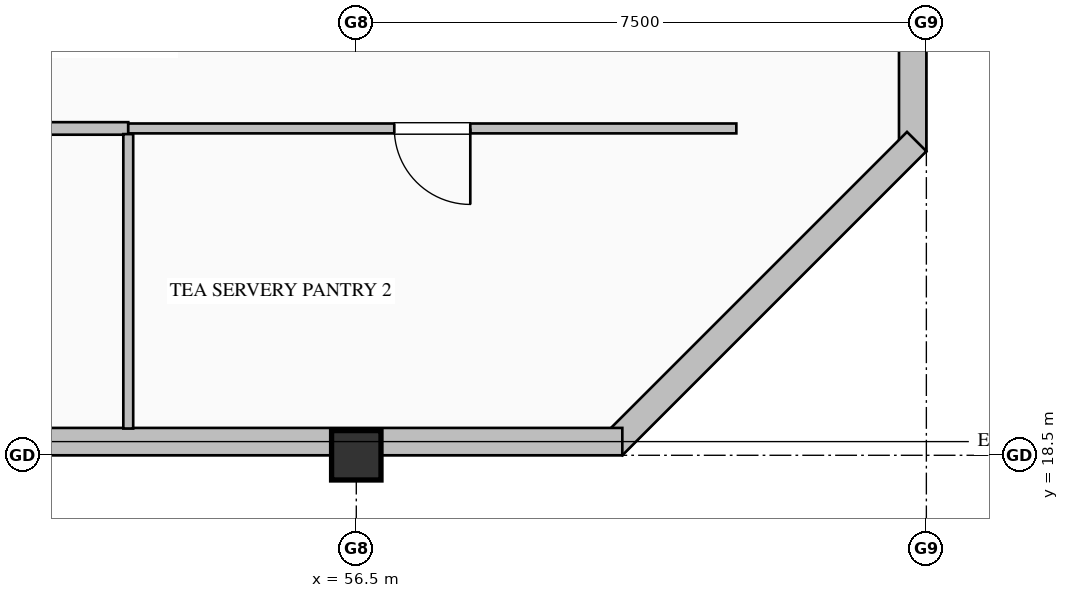
"""IFC4 building model, lengths in metres.
Left out: names, types, materials, properties, quantities, classifications, styles, units other than length and angle.
Written with IfcOpenShell. Run it as: python <this file> out.ifc"""

import sys

from ifc_helpers import new_model, si_unit, direction, frame, frame_2d, origin, origin_2d, place, context, subcontext, project, spatial, rectangle, hollow_rectangle, extrude, element, fill, save


model = new_model("IFC4")
c1 = context("Model", 3, precision=1e-05, world=origin(), true_north=direction((0.0, 1.0)))
c2 = subcontext(c1, "Body", "Model", "MODEL_VIEW")
j1 = project(units=[si_unit("LENGTHUNIT", "METRE"), si_unit("PLANEANGLEUNIT", "RADIAN")], contexts=[c1])
p1 = place(None, origin())
s1 = spatial("IfcSite", under=j1, at=p1, CompositionType="ELEMENT")
p2 = place(p1, origin())
s2 = spatial("IfcBuilding", under=s1, at=p2, CompositionType="ELEMENT")
p3 = place(p2, frame((0.0, 0.0, 327.2)))
s3 = spatial("IfcBuildingStorey", under=s2, at=p3, CompositionType="ELEMENT", Elevation=327.2)
p4 = place(p3, frame((56.5, 18.5, 0.0), z_axis=(0.0, 0.0, 1.0), x_axis=(1.0, 0.0, 0.0)))
e1 = element("IfcColumn", 1, at=p4, inside=s3, PredefinedType="COLUMN", context=c2, shape_type="SweptSolid", body=[
    extrude(hollow_rectangle(XDim=0.65, YDim=0.65, WallThickness=0.028, at=origin_2d()), origin(), (0.0, 0.0, 1.0), 4.0),
])
p5 = place(p3, frame((63.82, 36.05, 0.0), z_axis=(0.0, 0.0, 1.0), x_axis=(0.0, -1.0, 0.0)))
e2 = element("IfcWall", 2, at=p5, inside=s3, PredefinedType="SOLIDWALL", context=c2, shape_type="SweptSolid", body=[
    extrude(rectangle(XDim=13.55, YDim=0.36, at=frame_2d((6.775, 0.0))), origin(), (0.0, 0.0, 1.0), 3.335),
])
p6 = place(p5, frame((3.075, 0.0, 0.8)))
e3 = element("IfcOpeningElement", 3, at=p6, cuts=e2, PredefinedType="OPENING", context=c2, shape_type="SweptSolid", body=[
    extrude(rectangle(XDim=1.05, YDim=2.15, at=frame_2d((0.525, 1.075))), frame((0.0, 0.19, 0.0), z_axis=(0.0, -1.0, 0.0), x_axis=(1.0, 0.0, 0.0)), (0.0, 0.0, 1.0), 0.38),
])
p7 = place(p3, frame((63.873, 22.627, 0.0), z_axis=(0.0, 0.0, 1.0), x_axis=(-0.707106781187, -0.707106781187, 0.0)))
e4 = element("IfcWall", 4, at=p7, inside=s3, PredefinedType="SOLIDWALL", context=c2, shape_type="SweptSolid", body=[
    extrude(rectangle(XDim=5.657, YDim=0.36, at=frame_2d((2.828, 0.0))), origin(), (0.0, 0.0, 1.0), 3.785),
])
p8 = place(p3, frame((60.0, 18.68, 0.0), z_axis=(0.0, 0.0, 1.0), x_axis=(-1.0, 0.0, 0.0)))
e5 = element("IfcWall", 5, at=p8, inside=s3, PredefinedType="SOLIDWALL", context=c2, shape_type="SweptSolid", body=[
    extrude(rectangle(XDim=15.5, YDim=0.36, at=frame_2d((7.75, 0.0))), origin(), (0.0, 0.0, 1.0), 3.335),
])
p9 = place(p3, frame((53.5, 22.8, 0.0), z_axis=(0.0, 0.0, 1.0), x_axis=(-1.0, 0.0, 0.0)))
e6 = element("IfcWall", 6, at=p9, inside=s3, PredefinedType="PARTITIONING", context=c2, shape_type="SweptSolid", body=[
    extrude(rectangle(XDim=8.3, YDim=0.165, at=frame_2d((4.15, 0.0))), origin(), (0.0, 0.0, 1.0), 3.785),
])
p10 = place(p9, frame((3.65, 0.0, 0.0)))
e7 = element("IfcOpeningElement", 7, at=p10, cuts=e6, PredefinedType="OPENING", context=c2, shape_type="SweptSolid", body=[
    extrude(rectangle(XDim=1.0, YDim=2.15, at=frame_2d((0.5, 1.075))), frame((0.0, 0.093, 0.0), z_axis=(0.0, -1.0, 0.0), x_axis=(1.0, 0.0, 0.0)), (0.0, 0.0, 1.0), 0.185),
])
p11 = place(p3, frame((61.5, 22.8, 0.0), z_axis=(0.0, 0.0, 1.0), x_axis=(-1.0, 0.0, 0.0)))
e8 = element("IfcWall", 8, at=p11, inside=s3, PredefinedType="PARTITIONING", context=c2, shape_type="SweptSolid", body=[
    extrude(rectangle(XDim=8.0, YDim=0.13, at=frame_2d((4.0, 0.0))), origin(), (0.0, 0.0, 1.0), 3.785),
])
p12 = place(p11, frame((3.5, 0.0, 0.0)))
e9 = element("IfcOpeningElement", 9, at=p12, cuts=e8, PredefinedType="OPENING", context=c2, shape_type="SweptSolid", body=[
    extrude(rectangle(XDim=1.0, YDim=2.15, at=frame_2d((0.5, 1.075))), frame((0.0, 0.075, 0.0), z_axis=(0.0, -1.0, 0.0), x_axis=(1.0, 0.0, 0.0)), (0.0, 0.0, 1.0), 0.15),
])
p13 = place(p3, frame((53.5, 22.726, 0.0), z_axis=(0.0, 0.0, 1.0), x_axis=(0.0, -1.0, 0.0)))
e10 = element("IfcWall", 10, at=p13, inside=s3, PredefinedType="PARTITIONING", context=c2, shape_type="SweptSolid", body=[
    extrude(rectangle(XDim=3.874, YDim=0.13, at=frame_2d((1.937, 0.0))), origin(), (0.0, 0.0, 1.0), 3.785),
])
p14 = place(p12, origin())
e11 = element("IfcDoor", 11, at=p14, inside=s3, OperationType="SINGLE_SWING_LEFT", PredefinedType="DOOR", context=c2, shape_type="SweptSolid", body=[
    extrude(rectangle(XDim=1.0, YDim=2.15, at=frame_2d((0.5, 1.075))), frame((0.0, 0.025, 0.0), z_axis=(0.0, -1.0, 0.0), x_axis=(1.0, 0.0, 0.0)), (0.0, 0.0, 1.0), 0.05),
])
fill(e9, e11)
save(model, sys.argv[1])
